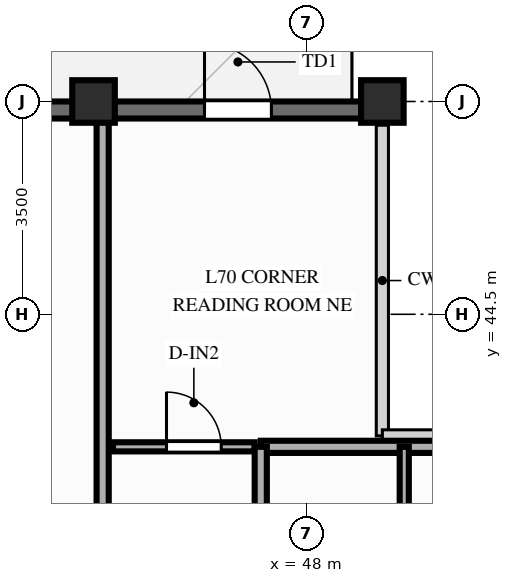
"""IFC4 building model, lengths in metres.
Left out: names, types, materials, properties, quantities, classifications, styles, units other than length and angle.
Written with IfcOpenShell. Run it as: python <this file> out.ifc"""

import sys

from ifc_helpers import new_model, si_unit, direction, frame, frame_2d, origin, origin_2d, place, context, subcontext, project, spatial, rectangle, extrude, source, transform, mapped, element, fill, save


model = new_model("IFC4")
c1 = context("Model", 3, precision=1e-05, world=origin(), true_north=direction((0.0, 1.0)))
c2 = subcontext(c1, "Body", "Model", "MODEL_VIEW")
j1 = project(units=[si_unit("LENGTHUNIT", "METRE"), si_unit("PLANEANGLEUNIT", "RADIAN")], contexts=[c1])
p1 = place(None, origin())
s1 = spatial("IfcSite", under=j1, at=p1, CompositionType="ELEMENT")
p2 = place(p1, origin())
s2 = spatial("IfcBuilding", under=s1, at=p2, CompositionType="ELEMENT")
p3 = place(p2, frame((0.0, 0.0, 226.2)))
s3 = spatial("IfcBuildingStorey", under=s2, at=p3, CompositionType="ELEMENT", Elevation=226.2)
m1 = source(origin(), c2, "Body", "SweptSolid", [
    extrude(rectangle(XDim=0.7, YDim=0.7, at=origin_2d()), origin(), (0.0, 0.0, 1.0), 3.9),
])
for number, where, z_axis, x_axis in (
    (1, (49.25, 48.0, 0.0), (0.0, 0.0, 1.0), (1.0, 0.0, 0.0)),
    (2, (44.5, 48.0, 0.0), (0.0, 0.0, 1.0), (1.0, 0.0, 0.0)),
):
    element("IfcColumn", number, at=place(p3, frame(where, z_axis=z_axis, x_axis=x_axis)), inside=s3, PredefinedType="COLUMN", context=c2, shape_type="MappedRepresentation", body=[
        mapped(m1, transform((0.0, 0.0, 0.0), scale=1.0)),
    ])
p4 = place(p3, frame((26.75, 47.86, 0.0), z_axis=(0.0, 0.0, 1.0), x_axis=(1.0, 0.0, 0.0)))
e3 = element("IfcWall", 3, at=p4, inside=s3, PredefinedType="SOLIDWALL", context=c2, shape_type="SweptSolid", body=[
    extrude(rectangle(XDim=22.5, YDim=0.28, at=frame_2d((11.25, 0.0))), origin(), (0.0, 0.0, 1.0), 2.79),
])
p5 = place(p4, frame((1.475, 0.0, 0.85)))
e4 = element("IfcOpeningElement", 4, at=p5, cuts=e3, PredefinedType="OPENING", context=c2, shape_type="SweptSolid", body=[
    extrude(rectangle(XDim=1.8, YDim=1.65, at=frame_2d((0.9, 0.825))), frame((0.0, 0.152, 0.0), z_axis=(0.0, -1.0, 0.0), x_axis=(1.0, 0.0, 0.0)), (0.0, 0.0, 1.0), 0.304),
])
p6 = place(p4, frame((5.37, 0.0, 0.85)))
e5 = element("IfcOpeningElement", 5, at=p6, cuts=e3, PredefinedType="OPENING", context=c2, shape_type="SweptSolid", body=[
    extrude(rectangle(XDim=0.95, YDim=1.5, at=frame_2d((0.475, 0.75))), frame((0.0, 0.152, 0.0), z_axis=(0.0, -1.0, 0.0), x_axis=(1.0, 0.0, 0.0)), (0.0, 0.0, 1.0), 0.304),
])
p7 = place(p4, frame((7.231, 0.0, 0.85)))
e6 = element("IfcOpeningElement", 6, at=p7, cuts=e3, PredefinedType="OPENING", context=c2, shape_type="SweptSolid", body=[
    extrude(rectangle(XDim=1.5, YDim=1.65, at=frame_2d((0.75, 0.825))), frame((0.0, 0.152, 0.0), z_axis=(0.0, -1.0, 0.0), x_axis=(1.0, 0.0, 0.0)), (0.0, 0.0, 1.0), 0.304),
])
p8 = place(p4, frame((9.757, 0.0, 0.85)))
e7 = element("IfcOpeningElement", 7, at=p8, cuts=e3, PredefinedType="OPENING", context=c2, shape_type="SweptSolid", body=[
    extrude(rectangle(XDim=1.8, YDim=1.65, at=frame_2d((0.9, 0.825))), frame((0.0, 0.152, 0.0), z_axis=(0.0, -1.0, 0.0), x_axis=(1.0, 0.0, 0.0)), (0.0, 0.0, 1.0), 0.304),
])
p9 = place(p4, frame((12.767, 0.0, 0.85)))
e8 = element("IfcOpeningElement", 8, at=p9, cuts=e3, PredefinedType="OPENING", context=c2, shape_type="SweptSolid", body=[
    extrude(rectangle(XDim=1.8, YDim=1.65, at=frame_2d((0.9, 0.825))), frame((0.0, 0.152, 0.0), z_axis=(0.0, -1.0, 0.0), x_axis=(1.0, 0.0, 0.0)), (0.0, 0.0, 1.0), 0.304),
])
p10 = place(p4, frame((15.796, 0.0, 0.85)))
e9 = element("IfcOpeningElement", 9, at=p10, cuts=e3, PredefinedType="OPENING", context=c2, shape_type="SweptSolid", body=[
    extrude(rectangle(XDim=1.2, YDim=1.5, at=frame_2d((0.6, 0.75))), frame((0.0, 0.152, 0.0), z_axis=(0.0, -1.0, 0.0), x_axis=(1.0, 0.0, 0.0)), (0.0, 0.0, 1.0), 0.304),
])
p11 = place(p4, frame((19.575, 0.0, 0.0)))
e10 = element("IfcOpeningElement", 10, at=p11, cuts=e3, PredefinedType="OPENING", context=c2, shape_type="SweptSolid", body=[
    extrude(rectangle(XDim=1.1, YDim=2.15, at=frame_2d((0.55, 1.075))), frame((0.0, 0.152, 0.0), z_axis=(0.0, -1.0, 0.0), x_axis=(1.0, 0.0, 0.0)), (0.0, 0.0, 1.0), 0.304),
])
p12 = place(p3, frame((44.82, 42.32, 0.0), z_axis=(0.0, 0.0, 1.0), x_axis=(1.0, 0.0, 0.0)))
e11 = element("IfcWall", 11, at=p12, inside=s3, PredefinedType="PARTITIONING", context=c2, shape_type="SweptSolid", body=[
    extrude(rectangle(XDim=2.33, YDim=0.15, at=frame_2d((1.165, 0.0))), origin(), (0.0, 0.0, 1.0), 3.69),
])
p13 = place(p12, frame((0.88, 0.0, 0.0)))
e12 = element("IfcOpeningElement", 12, at=p13, cuts=e11, PredefinedType="OPENING", context=c2, shape_type="SweptSolid", body=[
    extrude(rectangle(XDim=0.9, YDim=2.1, at=frame_2d((0.45, 1.05))), frame((0.0, 0.087, 0.0), z_axis=(0.0, -1.0, 0.0), x_axis=(1.0, 0.0, 0.0)), (0.0, 0.0, 1.0), 0.174),
])
p14 = place(p3, frame((44.65, 39.05, 0.0), z_axis=(0.0, 0.0, 1.0), x_axis=(0.0, 1.0, 0.0)))
e13 = element("IfcWall", 13, at=p14, inside=s3, PredefinedType="PARTITIONING", context=c2, shape_type="SweptSolid", body=[
    extrude(rectangle(XDim=8.8, YDim=0.2, at=frame_2d((4.4, 0.0))), origin(), (0.0, 0.0, 1.0), 2.79),
])
p15 = place(p3, frame((47.25, 42.32, 0.0), z_axis=(0.0, 0.0, 1.0), x_axis=(1.0, 0.0, 0.0)))
e14 = element("IfcWall", 14, at=p15, inside=s3, PredefinedType="PARTITIONING", context=c2, shape_type="SweptSolid", body=[
    extrude(rectangle(XDim=7.35, YDim=0.2, at=frame_2d((3.675, 0.0))), origin(), (0.0, 0.0, 1.0), 3.69),
])
p16 = place(p3, frame((47.25, 38.594, 0.0), z_axis=(0.0, 0.0, 1.0), x_axis=(0.0, 1.0, 0.0)))
e15 = element("IfcWall", 15, at=p16, inside=s3, PredefinedType="PARTITIONING", context=c2, shape_type="SweptSolid", body=[
    extrude(rectangle(XDim=3.726, YDim=0.2, at=frame_2d((1.863, 0.0))), origin(), (0.0, 0.0, 1.0), 3.69),
])
p17 = place(p3, frame((49.61, 38.594, 0.0), z_axis=(0.0, 0.0, 1.0), x_axis=(0.0, 1.0, 0.0)))
e16 = element("IfcWall", 16, at=p17, inside=s3, PredefinedType="PARTITIONING", context=c2, shape_type="SweptSolid", body=[
    extrude(rectangle(XDim=3.726, YDim=0.15, at=frame_2d((1.863, 0.0))), origin(), (0.0, 0.0, 1.0), 3.69),
])
m2 = source(origin(), c2, "Body", "SweptSolid", [
    extrude(rectangle(XDim=1.1, YDim=2.15, at=frame_2d((0.55, 1.075))), frame((0.0, 0.025, 0.0), z_axis=(0.0, -1.0, 0.0), x_axis=(1.0, 0.0, 0.0)), (0.0, 0.0, 1.0), 0.05),
])
p18 = place(p11, origin())
e17 = element("IfcDoor", 17, at=p18, inside=s3, OperationType="SINGLE_SWING_LEFT", PredefinedType="DOOR", context=c2, shape_type="MappedRepresentation", body=[
    mapped(m2, transform((0.0, 0.0, 0.0), scale=1.0)),
])
fill(e10, e17)
m3 = source(origin(), c2, "Body", "SweptSolid", [
    extrude(rectangle(XDim=0.9, YDim=2.1, at=frame_2d((0.45, 1.05))), frame((0.0, 0.025, 0.0), z_axis=(0.0, -1.0, 0.0), x_axis=(1.0, 0.0, 0.0)), (0.0, 0.0, 1.0), 0.05),
])
p19 = place(p13, origin())
e18 = element("IfcDoor", 18, at=p19, inside=s3, OperationType="SINGLE_SWING_LEFT", PredefinedType="DOOR", context=c2, shape_type="MappedRepresentation", body=[
    mapped(m3, transform((0.0, 0.0, 0.0), scale=1.0)),
])
fill(e12, e18)
save(model, sys.argv[1])
